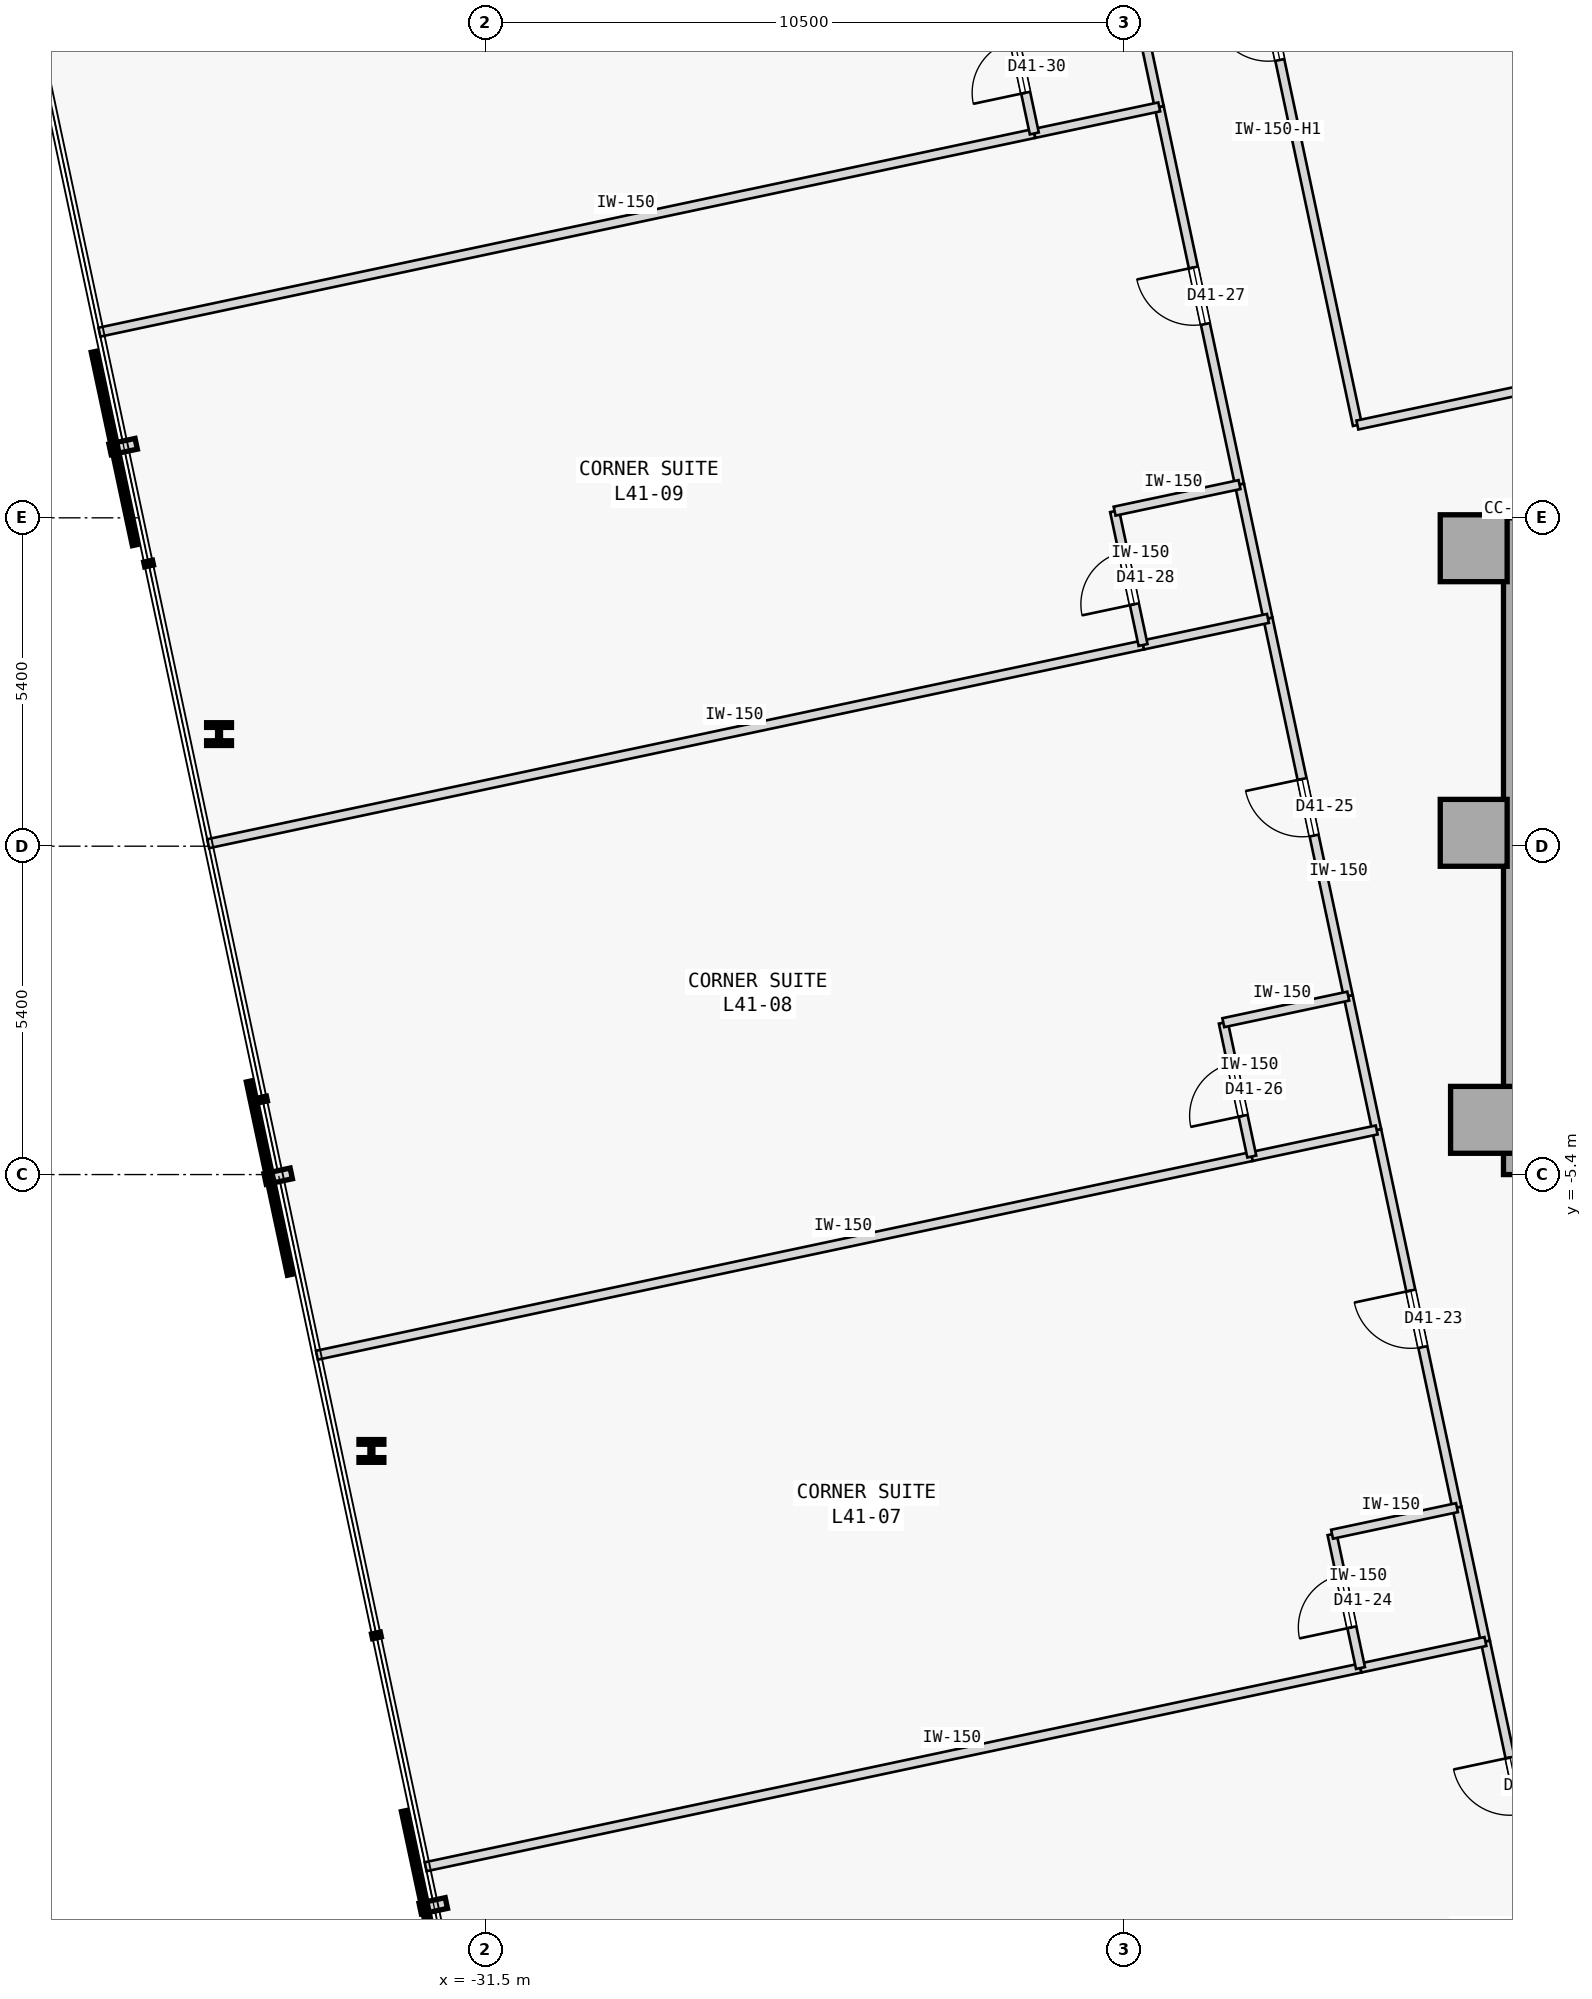
"""IFC4 building model, lengths in metres.
Left out: names, types, materials, properties, quantities, classifications, styles, units other than length and angle.
Written with IfcOpenShell. Run it as: python <this file> out.ifc"""

import sys

from ifc_helpers import new_model, si_unit, direction, frame, frame_2d, origin, origin_2d, place, context, subcontext, project, spatial, rectangle, i_section, extrude, element, fill, save


model = new_model("IFC4")
c1 = context("Model", 3, precision=1e-05, world=origin(), true_north=direction((0.0, 1.0)))
c2 = subcontext(c1, "Body", "Model", "MODEL_VIEW")
j1 = project(units=[si_unit("LENGTHUNIT", "METRE"), si_unit("PLANEANGLEUNIT", "RADIAN")], contexts=[c1])
p1 = place(None, origin())
s1 = spatial("IfcSite", under=j1, at=p1, CompositionType="ELEMENT")
p2 = place(p1, origin())
s2 = spatial("IfcBuilding", under=s1, at=p2, CompositionType="ELEMENT")
p3 = place(p2, frame((0.0, 0.0, 161.6)))
s3 = spatial("IfcBuildingStorey", under=s2, at=p3, CompositionType="ELEMENT", Elevation=161.6)
for number, where, z_axis, x_axis in (
    (1, (-15.25, 4.9, 0.0), (0.0, 0.0, 1.0), (1.0, 0.0, 0.0)),
    (2, (-15.25, 0.22, 0.0), (0.0, 0.0, 1.0), (1.0, 0.0, 0.0)),
    (3, (-15.08, -4.5, 0.0), (0.0, 0.0, 1.0), (1.0, 0.0, 0.0)),
):
    element("IfcColumn", number, at=place(p3, frame(where, z_axis=z_axis, x_axis=x_axis)), inside=s3, PredefinedType="COLUMN", context=c2, shape_type="SweptSolid", body=[
        extrude(rectangle(XDim=1.1, YDim=1.1, at=origin_2d()), origin(), (0.0, 0.0, 1.0), 3.4),
    ])
p4 = place(p3, frame((-14.56, -5.4, 0.0), z_axis=(0.0, 0.0, 1.0), x_axis=(0.0, 1.0, 0.0)))
e4 = element("IfcWall", 4, at=p4, inside=s3, PredefinedType="SHEAR", context=c2, shape_type="SweptSolid", body=[
    extrude(rectangle(XDim=10.8, YDim=0.4, at=frame_2d((5.4, 0.0))), origin(), (0.0, 0.0, 1.0), 3.175),
])
for number, where, z_axis, x_axis in (
    (5, (-35.883, 1.844, 0.0), (0.0, 0.0, 1.0), (1.0, 0.0, 0.0)),
    (6, (-33.377, -9.945, 0.0), (0.0, 0.0, 1.0), (1.0, 0.0, 0.0)),
):
    element("IfcColumn", number, at=place(p3, frame(where, z_axis=z_axis, x_axis=x_axis)), inside=s3, PredefinedType="COLUMN", context=c2, shape_type="SweptSolid", body=[
        extrude(i_section(OverallWidth=0.409, OverallDepth=0.374, WebThickness=0.048, FlangeThickness=0.077, FilletRadius=0.015, at=origin_2d()), origin(), (0.0, 0.0, 1.0), 3.4),
    ])
p5 = place(p3, frame((-17.162, 6.926, 0.0), z_axis=(0.0, 0.0, 1.0), x_axis=(-0.207911421929, 0.978147657888, 0.0)))
e7 = element("IfcWall", 7, at=p5, inside=s3, PredefinedType="PARTITIONING", context=c2, shape_type="SweptSolid", body=[
    extrude(rectangle(XDim=13.195, YDim=0.15, at=frame_2d((6.598, 0.0))), origin(), (0.0, 0.0, 1.0), 2.725),
])
p6 = place(p5, frame((6.137, 0.0, 0.0)))
e8 = element("IfcOpeningElement", 8, at=p6, cuts=e7, PredefinedType="OPENING", context=c2, shape_type="SweptSolid", body=[
    extrude(rectangle(XDim=0.92, YDim=2.15, at=frame_2d((0.46, 1.075))), frame((0.0, 0.085, 0.0), z_axis=(0.0, -1.0, 0.0), x_axis=(1.0, 0.0, 0.0)), (0.0, 0.0, 1.0), 0.17),
])
p7 = place(p3, frame((-17.162, 6.926, 0.0), z_axis=(0.0, 0.0, 1.0), x_axis=(0.978144196583, 0.207927705443, 0.0)))
e9 = element("IfcWall", 9, at=p7, inside=s3, PredefinedType="PARTITIONING", context=c2, shape_type="SweptSolid", body=[
    extrude(rectangle(XDim=5.717, YDim=0.15, at=frame_2d((2.858, 0.0))), origin(), (0.0, 0.0, 1.0), 3.175),
])
p8 = place(p3, frame((-14.049, -17.823, 0.0), z_axis=(0.0, 0.0, 1.0), x_axis=(-0.2079027059, 0.978149510494, 0.0)))
e10 = element("IfcWall", 10, at=p8, inside=s3, PredefinedType="PARTITIONING", context=c2, shape_type="SweptSolid", body=[
    extrude(rectangle(XDim=4.85, YDim=0.15, at=frame_2d((2.425, 0.0))), origin(), (0.0, 0.0, 1.0), 3.175),
])
p9 = place(p8, frame((1.95, 0.0, 0.0)))
e11 = element("IfcOpeningElement", 11, at=p9, cuts=e10, PredefinedType="OPENING", context=c2, shape_type="SweptSolid", body=[
    extrude(rectangle(XDim=0.95, YDim=2.15, at=frame_2d((0.475, 1.075))), frame((0.0, 0.085, 0.0), z_axis=(0.0, -1.0, 0.0), x_axis=(1.0, 0.0, 0.0)), (0.0, 0.0, 1.0), 0.17),
])
p10 = place(p3, frame((-15.525, -10.878, 0.0), z_axis=(0.0, 0.0, 1.0), x_axis=(-0.207887725283, 0.978152694459, 0.0)))
e12 = element("IfcWall", 12, at=p10, inside=s3, PredefinedType="PARTITIONING", context=c2, shape_type="SweptSolid", body=[
    extrude(rectangle(XDim=6.35, YDim=0.15, at=frame_2d((3.175, 0.0))), origin(), (0.0, 0.0, 1.0), 3.175),
])
p11 = place(p10, frame((2.7, 0.0, 0.0)))
e13 = element("IfcOpeningElement", 13, at=p11, cuts=e12, PredefinedType="OPENING", context=c2, shape_type="SweptSolid", body=[
    extrude(rectangle(XDim=0.95, YDim=2.15, at=frame_2d((0.475, 1.075))), frame((0.0, 0.085, 0.0), z_axis=(0.0, -1.0, 0.0), x_axis=(1.0, 0.0, 0.0)), (0.0, 0.0, 1.0), 0.17),
])
p12 = place(p3, frame((-15.057, -13.079, 0.0), z_axis=(0.0, 0.0, 1.0), x_axis=(-0.207995007687, 0.978129887478, 0.0)))
e14 = element("IfcWall", 14, at=p12, inside=s3, PredefinedType="PARTITIONING", context=c2, shape_type="SweptSolid", body=[
    extrude(rectangle(XDim=2.25, YDim=0.15, at=frame_2d((1.125, 0.0))), origin(), (0.0, 0.0, 1.0), 3.175),
])
p13 = place(p3, frame((-17.313, -2.466, 0.0), z_axis=(0.0, 0.0, 1.0), x_axis=(-0.207916691923, 0.978146537703, 0.0)))
e15 = element("IfcWall", 15, at=p13, inside=s3, PredefinedType="PARTITIONING", context=c2, shape_type="SweptSolid", body=[
    extrude(rectangle(XDim=6.35, YDim=0.15, at=frame_2d((3.175, 0.0))), origin(), (0.0, 0.0, 1.0), 3.175),
])
p14 = place(p13, frame((2.7, 0.0, 0.0)))
e16 = element("IfcOpeningElement", 16, at=p14, cuts=e15, PredefinedType="OPENING", context=c2, shape_type="SweptSolid", body=[
    extrude(rectangle(XDim=0.95, YDim=2.15, at=frame_2d((0.475, 1.075))), frame((0.0, 0.085, 0.0), z_axis=(0.0, -1.0, 0.0), x_axis=(1.0, 0.0, 0.0)), (0.0, 0.0, 1.0), 0.17),
])
p15 = place(p3, frame((-16.845, -4.667, 0.0), z_axis=(0.0, 0.0, 1.0), x_axis=(-0.207913264065, 0.978147266328, 0.0)))
e17 = element("IfcWall", 17, at=p15, inside=s3, PredefinedType="PARTITIONING", context=c2, shape_type="SweptSolid", body=[
    extrude(rectangle(XDim=2.25, YDim=0.15, at=frame_2d((1.125, 0.0))), origin(), (0.0, 0.0, 1.0), 3.175),
])
p16 = place(p3, frame((-19.101, 5.946, 0.0), z_axis=(0.0, 0.0, 1.0), x_axis=(-0.207916691923, 0.978146537703, 0.0)))
e18 = element("IfcWall", 18, at=p16, inside=s3, PredefinedType="PARTITIONING", context=c2, shape_type="SweptSolid", body=[
    extrude(rectangle(XDim=6.35, YDim=0.15, at=frame_2d((3.175, 0.0))), origin(), (0.0, 0.0, 1.0), 3.175),
])
p17 = place(p16, frame((2.7, 0.0, 0.0)))
e19 = element("IfcOpeningElement", 19, at=p17, cuts=e18, PredefinedType="OPENING", context=c2, shape_type="SweptSolid", body=[
    extrude(rectangle(XDim=0.95, YDim=2.15, at=frame_2d((0.475, 1.075))), frame((0.0, 0.085, 0.0), z_axis=(0.0, -1.0, 0.0), x_axis=(1.0, 0.0, 0.0)), (0.0, 0.0, 1.0), 0.17),
])
for number, where, z_axis, x_axis in (
    (20, (-18.633, 3.746, 0.0), (0.0, 0.0, 1.0), (-0.208, 0.978, 0.0)),
    (21, (-20.421, 12.158, 0.0), (0.0, 0.0, 1.0), (-0.208, 0.978, 0.0)),
):
    element("IfcWall", number, at=place(p3, frame(where, z_axis=z_axis, x_axis=x_axis)), inside=s3, PredefinedType="PARTITIONING", context=c2, shape_type="SweptSolid", body=[
        extrude(rectangle(XDim=2.25, YDim=0.15, at=frame_2d((1.125, 0.0))), origin(), (0.0, 0.0, 1.0), 3.175),
    ])
p18 = place(p3, frame((-12.069, 10.462, 0.0), z_axis=(0.0, 0.0, 1.0), x_axis=(-0.207914988081, 0.978146899873, 0.0)))
e22 = element("IfcWall", 22, at=p18, inside=s3, PredefinedType="PARTITIONING", context=c2, shape_type="SweptSolid", body=[
    extrude(rectangle(XDim=11.995, YDim=0.15, at=frame_2d((5.998, 0.0))), origin(), (0.0, 0.0, 1.0), 3.175),
])
p19 = place(p3, frame((-32.486, -16.783, 0.0), z_axis=(0.0, 0.0, 1.0), x_axis=(0.978146137903, 0.207918572776, 0.0)))
e23 = element("IfcWall", 23, at=p19, inside=s3, PredefinedType="PARTITIONING", context=c2, shape_type="SweptSolid", body=[
    extrude(rectangle(XDim=15.718, YDim=0.15, at=frame_2d((7.859, 0.0))), origin(), (0.0, 0.0, 1.0), 3.175),
])
p20 = place(p3, frame((-17.111, -13.515, 0.0), z_axis=(0.0, 0.0, 1.0), x_axis=(0.97815826, 0.207861536591, 0.0)))
e24 = element("IfcWall", 24, at=p20, inside=s3, PredefinedType="PARTITIONING", context=c2, shape_type="SweptSolid", body=[
    extrude(rectangle(XDim=2.1, YDim=0.15, at=frame_2d((1.05, 0.0))), origin(), (0.0, 0.0, 1.0), 3.175),
])
p21 = place(p3, frame((-17.111, -13.515, 0.0), z_axis=(0.0, 0.0, 1.0), x_axis=(-0.207913264065, 0.978147266328, 0.0)))
e25 = element("IfcWall", 25, at=p21, inside=s3, PredefinedType="PARTITIONING", context=c2, shape_type="SweptSolid", body=[
    extrude(rectangle(XDim=2.25, YDim=0.15, at=frame_2d((1.125, 0.0))), origin(), (0.0, 0.0, 1.0), 3.175),
])
p22 = place(p21, frame((0.685, 0.0, 0.0)))
e26 = element("IfcOpeningElement", 26, at=p22, cuts=e25, PredefinedType="OPENING", context=c2, shape_type="SweptSolid", body=[
    extrude(rectangle(XDim=0.88, YDim=2.15, at=frame_2d((0.44, 1.075))), frame((0.0, 0.085, 0.0), z_axis=(0.0, -1.0, 0.0), x_axis=(1.0, 0.0, 0.0)), (0.0, 0.0, 1.0), 0.17),
])
p23 = place(p3, frame((-17.579, -11.314, 0.0), z_axis=(0.0, 0.0, 1.0), x_axis=(0.978129588365, 0.207996414309, 0.0)))
e27 = element("IfcWall", 27, at=p23, inside=s3, PredefinedType="PARTITIONING", context=c2, shape_type="SweptSolid", body=[
    extrude(rectangle(XDim=2.1, YDim=0.15, at=frame_2d((1.05, 0.0))), origin(), (0.0, 0.0, 1.0), 3.175),
])
p24 = place(p3, frame((-34.274, -8.371, 0.0), z_axis=(0.0, 0.0, 1.0), x_axis=(0.978146137903, 0.207918572776, 0.0)))
e28 = element("IfcWall", 28, at=p24, inside=s3, PredefinedType="PARTITIONING", context=c2, shape_type="SweptSolid", body=[
    extrude(rectangle(XDim=15.718, YDim=0.15, at=frame_2d((7.859, 0.0))), origin(), (0.0, 0.0, 1.0), 3.175),
])
p25 = place(p3, frame((-18.899, -5.103, 0.0), z_axis=(0.0, 0.0, 1.0), x_axis=(0.97815826, 0.207861536591, 0.0)))
e29 = element("IfcWall", 29, at=p25, inside=s3, PredefinedType="PARTITIONING", context=c2, shape_type="SweptSolid", body=[
    extrude(rectangle(XDim=2.1, YDim=0.15, at=frame_2d((1.05, 0.0))), origin(), (0.0, 0.0, 1.0), 3.175),
])
p26 = place(p3, frame((-18.899, -5.103, 0.0), z_axis=(0.0, 0.0, 1.0), x_axis=(-0.207913264065, 0.978147266328, 0.0)))
e30 = element("IfcWall", 30, at=p26, inside=s3, PredefinedType="PARTITIONING", context=c2, shape_type="SweptSolid", body=[
    extrude(rectangle(XDim=2.25, YDim=0.15, at=frame_2d((1.125, 0.0))), origin(), (0.0, 0.0, 1.0), 3.175),
])
p27 = place(p26, frame((0.685, 0.0, 0.0)))
e31 = element("IfcOpeningElement", 31, at=p27, cuts=e30, PredefinedType="OPENING", context=c2, shape_type="SweptSolid", body=[
    extrude(rectangle(XDim=0.88, YDim=2.15, at=frame_2d((0.44, 1.075))), frame((0.0, 0.085, 0.0), z_axis=(0.0, -1.0, 0.0), x_axis=(1.0, 0.0, 0.0)), (0.0, 0.0, 1.0), 0.17),
])
p28 = place(p3, frame((-19.367, -2.902, 0.0), z_axis=(0.0, 0.0, 1.0), x_axis=(0.97815826, 0.207861536591, 0.0)))
e32 = element("IfcWall", 32, at=p28, inside=s3, PredefinedType="PARTITIONING", context=c2, shape_type="SweptSolid", body=[
    extrude(rectangle(XDim=2.1, YDim=0.15, at=frame_2d((1.05, 0.0))), origin(), (0.0, 0.0, 1.0), 3.175),
])
p29 = place(p3, frame((-36.062, 0.041, 0.0), z_axis=(0.0, 0.0, 1.0), x_axis=(0.978149296727, 0.207903711638, 0.0)))
e33 = element("IfcWall", 33, at=p29, inside=s3, PredefinedType="PARTITIONING", context=c2, shape_type="SweptSolid", body=[
    extrude(rectangle(XDim=15.718, YDim=0.15, at=frame_2d((7.859, 0.0))), origin(), (0.0, 0.0, 1.0), 3.175),
])
p30 = place(p3, frame((-20.688, 3.309, 0.0), z_axis=(0.0, 0.0, 1.0), x_axis=(0.978134617382, 0.207972763311, 0.0)))
e34 = element("IfcWall", 34, at=p30, inside=s3, PredefinedType="PARTITIONING", context=c2, shape_type="SweptSolid", body=[
    extrude(rectangle(XDim=2.1, YDim=0.15, at=frame_2d((1.05, 0.0))), origin(), (0.0, 0.0, 1.0), 3.175),
])
p31 = place(p3, frame((-20.688, 3.309, 0.0), z_axis=(0.0, 0.0, 1.0), x_axis=(-0.207891197838, 0.978151956427, 0.0)))
e35 = element("IfcWall", 35, at=p31, inside=s3, PredefinedType="PARTITIONING", context=c2, shape_type="SweptSolid", body=[
    extrude(rectangle(XDim=2.25, YDim=0.15, at=frame_2d((1.125, 0.0))), origin(), (0.0, 0.0, 1.0), 3.175),
])
p32 = place(p31, frame((0.685, 0.0, 0.0)))
e36 = element("IfcOpeningElement", 36, at=p32, cuts=e35, PredefinedType="OPENING", context=c2, shape_type="SweptSolid", body=[
    extrude(rectangle(XDim=0.88, YDim=2.15, at=frame_2d((0.44, 1.075))), frame((0.0, 0.085, 0.0), z_axis=(0.0, -1.0, 0.0), x_axis=(1.0, 0.0, 0.0)), (0.0, 0.0, 1.0), 0.17),
])
p33 = place(p3, frame((-21.155, 5.51, 0.0), z_axis=(0.0, 0.0, 1.0), x_axis=(0.97815826, 0.207861536591, 0.0)))
e37 = element("IfcWall", 37, at=p33, inside=s3, PredefinedType="PARTITIONING", context=c2, shape_type="SweptSolid", body=[
    extrude(rectangle(XDim=2.1, YDim=0.15, at=frame_2d((1.05, 0.0))), origin(), (0.0, 0.0, 1.0), 3.175),
])
p34 = place(p3, frame((-37.85, 8.453, 0.0), z_axis=(0.0, 0.0, 1.0), x_axis=(0.978149296727, 0.207903711638, 0.0)))
e38 = element("IfcWall", 38, at=p34, inside=s3, PredefinedType="PARTITIONING", context=c2, shape_type="SweptSolid", body=[
    extrude(rectangle(XDim=15.718, YDim=0.15, at=frame_2d((7.859, 0.0))), origin(), (0.0, 0.0, 1.0), 3.175),
])
p35 = place(p3, frame((-22.476, 11.721, 0.0), z_axis=(0.0, 0.0, 1.0), x_axis=(0.978134617382, 0.207972763311, 0.0)))
e39 = element("IfcWall", 39, at=p35, inside=s3, PredefinedType="PARTITIONING", context=c2, shape_type="SweptSolid", body=[
    extrude(rectangle(XDim=2.1, YDim=0.15, at=frame_2d((1.05, 0.0))), origin(), (0.0, 0.0, 1.0), 3.175),
])
p36 = place(p3, frame((-22.476, 11.721, 0.0), z_axis=(0.0, 0.0, 1.0), x_axis=(-0.207891197838, 0.978151956427, 0.0)))
e40 = element("IfcWall", 40, at=p36, inside=s3, PredefinedType="PARTITIONING", context=c2, shape_type="SweptSolid", body=[
    extrude(rectangle(XDim=2.25, YDim=0.15, at=frame_2d((1.125, 0.0))), origin(), (0.0, 0.0, 1.0), 3.175),
])
p37 = place(p36, frame((0.685, 0.0, 0.0)))
e41 = element("IfcOpeningElement", 41, at=p37, cuts=e40, PredefinedType="OPENING", context=c2, shape_type="SweptSolid", body=[
    extrude(rectangle(XDim=0.88, YDim=2.15, at=frame_2d((0.44, 1.075))), frame((0.0, 0.085, 0.0), z_axis=(0.0, -1.0, 0.0), x_axis=(1.0, 0.0, 0.0)), (0.0, 0.0, 1.0), 0.17),
])
p38 = place(p6, origin())
e42 = element("IfcDoor", 42, at=p38, inside=s3, OperationType="SINGLE_SWING_RIGHT", PredefinedType="DOOR", context=c2, shape_type="SweptSolid", body=[
    extrude(rectangle(XDim=0.92, YDim=2.15, at=frame_2d((0.46, 1.075))), frame((0.0, 0.025, 0.0), z_axis=(0.0, -1.0, 0.0), x_axis=(1.0, 0.0, 0.0)), (0.0, 0.0, 1.0), 0.05),
])
fill(e8, e42)
p39 = place(p9, origin())
e43 = element("IfcDoor", 43, at=p39, inside=s3, OperationType="SINGLE_SWING_RIGHT", PredefinedType="DOOR", context=c2, shape_type="SweptSolid", body=[
    extrude(rectangle(XDim=0.95, YDim=2.15, at=frame_2d((0.475, 1.075))), frame((0.0, 0.025, 0.0), z_axis=(0.0, -1.0, 0.0), x_axis=(1.0, 0.0, 0.0)), (0.0, 0.0, 1.0), 0.05),
])
fill(e11, e43)
p40 = place(p11, origin())
e44 = element("IfcDoor", 44, at=p40, inside=s3, OperationType="SINGLE_SWING_RIGHT", PredefinedType="DOOR", context=c2, shape_type="SweptSolid", body=[
    extrude(rectangle(XDim=0.95, YDim=2.15, at=frame_2d((0.475, 1.075))), frame((0.0, 0.025, 0.0), z_axis=(0.0, -1.0, 0.0), x_axis=(1.0, 0.0, 0.0)), (0.0, 0.0, 1.0), 0.05),
])
fill(e13, e44)
p41 = place(p22, origin())
e45 = element("IfcDoor", 45, at=p41, inside=s3, OperationType="SINGLE_SWING_LEFT", PredefinedType="DOOR", context=c2, shape_type="SweptSolid", body=[
    extrude(rectangle(XDim=0.88, YDim=2.15, at=frame_2d((0.44, 1.075))), frame((0.0, 0.025, 0.0), z_axis=(0.0, -1.0, 0.0), x_axis=(1.0, 0.0, 0.0)), (0.0, 0.0, 1.0), 0.05),
])
fill(e26, e45)
p42 = place(p14, origin())
e46 = element("IfcDoor", 46, at=p42, inside=s3, OperationType="SINGLE_SWING_RIGHT", PredefinedType="DOOR", context=c2, shape_type="SweptSolid", body=[
    extrude(rectangle(XDim=0.95, YDim=2.15, at=frame_2d((0.475, 1.075))), frame((0.0, 0.025, 0.0), z_axis=(0.0, -1.0, 0.0), x_axis=(1.0, 0.0, 0.0)), (0.0, 0.0, 1.0), 0.05),
])
fill(e16, e46)
p43 = place(p27, origin())
e47 = element("IfcDoor", 47, at=p43, inside=s3, OperationType="SINGLE_SWING_LEFT", PredefinedType="DOOR", context=c2, shape_type="SweptSolid", body=[
    extrude(rectangle(XDim=0.88, YDim=2.15, at=frame_2d((0.44, 1.075))), frame((0.0, 0.025, 0.0), z_axis=(0.0, -1.0, 0.0), x_axis=(1.0, 0.0, 0.0)), (0.0, 0.0, 1.0), 0.05),
])
fill(e31, e47)
p44 = place(p17, origin())
e48 = element("IfcDoor", 48, at=p44, inside=s3, OperationType="SINGLE_SWING_RIGHT", PredefinedType="DOOR", context=c2, shape_type="SweptSolid", body=[
    extrude(rectangle(XDim=0.95, YDim=2.15, at=frame_2d((0.475, 1.075))), frame((0.0, 0.025, 0.0), z_axis=(0.0, -1.0, 0.0), x_axis=(1.0, 0.0, 0.0)), (0.0, 0.0, 1.0), 0.05),
])
fill(e19, e48)
p45 = place(p32, origin())
e49 = element("IfcDoor", 49, at=p45, inside=s3, OperationType="SINGLE_SWING_LEFT", PredefinedType="DOOR", context=c2, shape_type="SweptSolid", body=[
    extrude(rectangle(XDim=0.88, YDim=2.15, at=frame_2d((0.44, 1.075))), frame((0.0, 0.025, 0.0), z_axis=(0.0, -1.0, 0.0), x_axis=(1.0, 0.0, 0.0)), (0.0, 0.0, 1.0), 0.05),
])
fill(e36, e49)
p46 = place(p37, origin())
e50 = element("IfcDoor", 50, at=p46, inside=s3, OperationType="SINGLE_SWING_LEFT", PredefinedType="DOOR", context=c2, shape_type="SweptSolid", body=[
    extrude(rectangle(XDim=0.88, YDim=2.15, at=frame_2d((0.44, 1.075))), frame((0.0, 0.025, 0.0), z_axis=(0.0, -1.0, 0.0), x_axis=(1.0, 0.0, 0.0)), (0.0, 0.0, 1.0), 0.05),
])
fill(e41, e50)
save(model, sys.argv[1])
